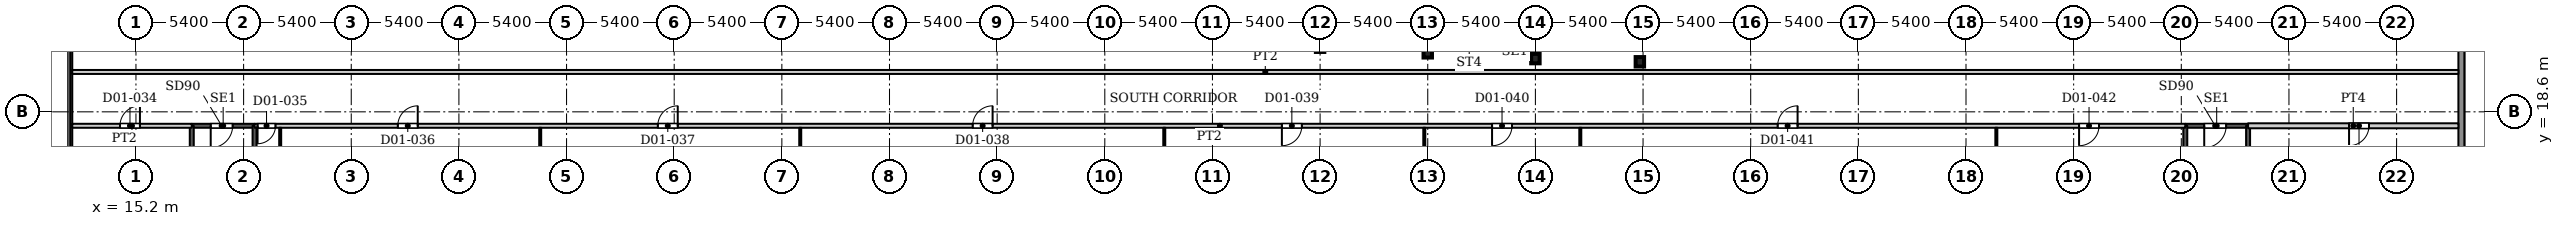
"""IFC4 building model, lengths in metres.
Left out: names, types, materials, properties, quantities, classifications, styles, units other than length and angle.
Written with IfcOpenShell. Run it as: python <this file> out.ifc"""

import sys

from ifc_helpers import new_model, si_unit, direction, frame, frame_2d, origin, origin_2d, place, context, subcontext, project, spatial, rectangle, i_section, extrude, source, transform, mapped, element, fill, save


model = new_model("IFC4")
c1 = context("Model", 3, precision=1e-05, world=origin(), true_north=direction((0.0, 1.0)))
c2 = subcontext(c1, "Body", "Model", "MODEL_VIEW")
j1 = project(units=[si_unit("LENGTHUNIT", "METRE"), si_unit("PLANEANGLEUNIT", "RADIAN")], contexts=[c1])
p1 = place(None, origin())
s1 = spatial("IfcSite", under=j1, at=p1, CompositionType="ELEMENT")
p2 = place(p1, origin())
s2 = spatial("IfcBuilding", under=s1, at=p2, CompositionType="ELEMENT")
p3 = place(p2, frame((0.0, 0.0, 7.5)))
s3 = spatial("IfcBuildingStorey", under=s2, at=p3, CompositionType="ELEMENT", Elevation=7.5)
for number, where, z_axis, x_axis in (
    (1, (90.64, 21.11, 0.0), (0.0, 0.0, 1.0), (1.0, 0.0, 0.0)),
    (2, (85.4, 21.27, 0.0), (0.0, 0.0, 1.0), (1.0, 0.0, 0.0)),
    (3, (80.0, 21.56, 0.0), (0.0, 0.0, 1.0), (1.0, 0.0, 0.0)),
):
    element("IfcColumn", number, at=place(p3, frame(where, z_axis=z_axis, x_axis=x_axis)), inside=s3, PredefinedType="COLUMN", context=c2, shape_type="SweptSolid", body=[
        extrude(i_section(OverallWidth=0.424, OverallDepth=0.474, WebThickness=0.048, FlangeThickness=0.077, FilletRadius=0.014, at=origin_2d()), origin(), (0.0, 0.0, 1.0), 5.0),
    ])
p4 = place(p3, frame((131.85, 54.72, 0.0), z_axis=(0.0, 0.0, 1.0), x_axis=(0.0, -1.0, 0.0)))
e4 = element("IfcWall", 4, at=p4, inside=s3, PredefinedType="SOLIDWALL", context=c2, shape_type="SweptSolid", body=[
    extrude(rectangle(XDim=38.72, YDim=0.3, at=frame_2d((19.36, 0.0))), origin(), (0.0, 0.0, 1.0), 4.75),
])
p5 = place(p4, frame((2.435, 0.0, 0.6)))
e5 = element("IfcOpeningElement", 5, at=p5, cuts=e4, PredefinedType="OPENING", context=c2, shape_type="SweptSolid", body=[
    extrude(rectangle(XDim=2.7, YDim=3.0, at=frame_2d((1.35, 1.5))), frame((0.0, 0.16, 0.0), z_axis=(0.0, -1.0, 0.0), x_axis=(1.0, 0.0, 0.0)), (0.0, 0.0, 1.0), 0.32),
])
p6 = place(p4, frame((13.58, 0.0, 0.6)))
e6 = element("IfcOpeningElement", 6, at=p6, cuts=e4, PredefinedType="OPENING", context=c2, shape_type="SweptSolid", body=[
    extrude(rectangle(XDim=2.7, YDim=3.0, at=frame_2d((1.35, 1.5))), frame((0.0, 0.16, 0.0), z_axis=(0.0, -1.0, 0.0), x_axis=(1.0, 0.0, 0.0)), (0.0, 0.0, 1.0), 0.32),
])
p7 = place(p4, frame((26.16, 0.0, 0.6)))
e7 = element("IfcOpeningElement", 7, at=p7, cuts=e4, PredefinedType="OPENING", context=c2, shape_type="SweptSolid", body=[
    extrude(rectangle(XDim=2.7, YDim=3.0, at=frame_2d((1.35, 1.5))), frame((0.0, 0.16, 0.0), z_axis=(0.0, -1.0, 0.0), x_axis=(1.0, 0.0, 0.0)), (0.0, 0.0, 1.0), 0.32),
])
p8 = place(p3, frame((18.0, 17.9, 0.0), z_axis=(0.0, 0.0, 1.0), x_axis=(1.0, 0.0, 0.0)))
e8 = element("IfcWall", 8, at=p8, inside=s3, PredefinedType="SHEAR", context=c2, shape_type="SweptSolid", body=[
    extrude(rectangle(XDim=3.15, YDim=0.2, at=frame_2d((1.575, 0.0))), origin(), (0.0, 0.0, 1.0), 5.0),
])
p9 = place(p8, frame((0.95, 0.0, 0.0)))
e9 = element("IfcOpeningElement", 9, at=p9, cuts=e8, PredefinedType="OPENING", context=c2, shape_type="SweptSolid", body=[
    extrude(rectangle(XDim=1.1, YDim=2.2, at=frame_2d((0.55, 1.1))), frame((0.0, 0.11, 0.0), z_axis=(0.0, -1.0, 0.0), x_axis=(1.0, 0.0, 0.0)), (0.0, 0.0, 1.0), 0.22),
])
p10 = place(p3, frame((18.0, 11.2, 0.0), z_axis=(0.0, 0.0, 1.0), x_axis=(0.0, 1.0, 0.0)))
e10 = element("IfcWall", 10, at=p10, inside=s3, PredefinedType="SHEAR", context=c2, shape_type="SweptSolid", body=[
    extrude(rectangle(XDim=6.7, YDim=0.2, at=frame_2d((3.35, 0.0))), origin(), (0.0, 0.0, 1.0), 5.0),
])
p11 = place(p3, frame((21.15, 10.0, 0.0), z_axis=(0.0, 0.0, 1.0), x_axis=(0.0, 1.0, 0.0)))
e11 = element("IfcWall", 11, at=p11, inside=s3, PredefinedType="SHEAR", context=c2, shape_type="SweptSolid", body=[
    extrude(rectangle(XDim=7.9, YDim=0.2, at=frame_2d((3.95, 0.0))), origin(), (0.0, 0.0, 1.0), 5.0),
])
p12 = place(p3, frame((118.0, 17.9, 0.0), z_axis=(0.0, 0.0, 1.0), x_axis=(1.0, 0.0, 0.0)))
e12 = element("IfcWall", 12, at=p12, inside=s3, PredefinedType="SHEAR", context=c2, shape_type="SweptSolid", body=[
    extrude(rectangle(XDim=3.15, YDim=0.2, at=frame_2d((1.575, 0.0))), origin(), (0.0, 0.0, 1.0), 5.0),
])
p13 = place(p12, frame((0.95, 0.0, 0.0)))
e13 = element("IfcOpeningElement", 13, at=p13, cuts=e12, PredefinedType="OPENING", context=c2, shape_type="SweptSolid", body=[
    extrude(rectangle(XDim=1.1, YDim=2.2, at=frame_2d((0.55, 1.1))), frame((0.0, 0.11, 0.0), z_axis=(0.0, -1.0, 0.0), x_axis=(1.0, 0.0, 0.0)), (0.0, 0.0, 1.0), 0.22),
])
p14 = place(p3, frame((118.0, 11.2, 0.0), z_axis=(0.0, 0.0, 1.0), x_axis=(0.0, 1.0, 0.0)))
e14 = element("IfcWall", 14, at=p14, inside=s3, PredefinedType="SHEAR", context=c2, shape_type="SweptSolid", body=[
    extrude(rectangle(XDim=6.7, YDim=0.2, at=frame_2d((3.35, 0.0))), origin(), (0.0, 0.0, 1.0), 5.0),
])
p15 = place(p3, frame((121.15, 10.0, 0.0), z_axis=(0.0, 0.0, 1.0), x_axis=(0.0, 1.0, 0.0)))
e15 = element("IfcWall", 15, at=p15, inside=s3, PredefinedType="SHEAR", context=c2, shape_type="SweptSolid", body=[
    extrude(rectangle(XDim=7.9, YDim=0.2, at=frame_2d((3.95, 0.0))), origin(), (0.0, 0.0, 1.0), 5.0),
])
p16 = place(p3, frame((12.0, 17.9, 0.0), z_axis=(0.0, 0.0, 1.0), x_axis=(1.0, 0.0, 0.0)))
e16 = element("IfcWall", 16, at=p16, inside=s3, PredefinedType="PARTITIONING", context=c2, shape_type="SweptSolid", body=[
    extrude(rectangle(XDim=6.0, YDim=0.2, at=frame_2d((3.0, 0.0))), origin(), (0.0, 0.0, 1.0), 4.68),
])
p17 = place(p16, frame((2.4, 0.0, 0.0)))
e17 = element("IfcOpeningElement", 17, at=p17, cuts=e16, PredefinedType="OPENING", context=c2, shape_type="SweptSolid", body=[
    extrude(rectangle(XDim=1.0, YDim=2.1, at=frame_2d((0.5, 1.05))), frame((0.0, 0.11, 0.0), z_axis=(0.0, -1.0, 0.0), x_axis=(1.0, 0.0, 0.0)), (0.0, 0.0, 1.0), 0.22),
])
p18 = place(p3, frame((12.0, 20.6, 0.0), z_axis=(0.0, 0.0, 1.0), x_axis=(1.0, 0.0, 0.0)))
e18 = element("IfcWall", 18, at=p18, inside=s3, PredefinedType="PARTITIONING", context=c2, shape_type="SweptSolid", body=[
    extrude(rectangle(XDim=119.701, YDim=0.2, at=frame_2d((59.851, 0.0))), origin(), (0.0, 0.0, 1.0), 4.68),
])
p19 = place(p3, frame((21.15, 17.9, 0.0), z_axis=(0.0, 0.0, 1.0), x_axis=(1.0, 0.0, 0.0)))
e19 = element("IfcWall", 19, at=p19, inside=s3, PredefinedType="PARTITIONING", context=c2, shape_type="SweptSolid", body=[
    extrude(rectangle(XDim=96.85, YDim=0.2, at=frame_2d((48.425, 0.0))), origin(), (0.0, 0.0, 1.0), 4.68),
])
p20 = place(p19, frame((0.15, 0.0, 0.0)))
e20 = element("IfcOpeningElement", 20, at=p20, cuts=e19, PredefinedType="OPENING", context=c2, shape_type="SweptSolid", body=[
    extrude(rectangle(XDim=0.9, YDim=2.1, at=frame_2d((0.45, 1.05))), frame((0.0, 0.11, 0.0), z_axis=(0.0, -1.0, 0.0), x_axis=(1.0, 0.0, 0.0)), (0.0, 0.0, 1.0), 0.22),
])
p21 = place(p19, frame((7.185, 0.0, 0.0)))
e21 = element("IfcOpeningElement", 21, at=p21, cuts=e19, PredefinedType="OPENING", context=c2, shape_type="SweptSolid", body=[
    extrude(rectangle(XDim=1.0, YDim=2.1, at=frame_2d((0.5, 1.05))), frame((0.0, 0.11, 0.0), z_axis=(0.0, -1.0, 0.0), x_axis=(1.0, 0.0, 0.0)), (0.0, 0.0, 1.0), 0.22),
])
p22 = place(p19, frame((20.228, 0.0, 0.0)))
e22 = element("IfcOpeningElement", 22, at=p22, cuts=e19, PredefinedType="OPENING", context=c2, shape_type="SweptSolid", body=[
    extrude(rectangle(XDim=1.0, YDim=2.1, at=frame_2d((0.5, 1.05))), frame((0.0, 0.11, 0.0), z_axis=(0.0, -1.0, 0.0), x_axis=(1.0, 0.0, 0.0)), (0.0, 0.0, 1.0), 0.22),
])
p23 = place(p19, frame((36.022, 0.0, 0.0)))
e23 = element("IfcOpeningElement", 23, at=p23, cuts=e19, PredefinedType="OPENING", context=c2, shape_type="SweptSolid", body=[
    extrude(rectangle(XDim=1.0, YDim=2.1, at=frame_2d((0.5, 1.05))), frame((0.0, 0.11, 0.0), z_axis=(0.0, -1.0, 0.0), x_axis=(1.0, 0.0, 0.0)), (0.0, 0.0, 1.0), 0.22),
])
p24 = place(p19, frame((51.533, 0.0, 0.0)))
e24 = element("IfcOpeningElement", 24, at=p24, cuts=e19, PredefinedType="OPENING", context=c2, shape_type="SweptSolid", body=[
    extrude(rectangle(XDim=1.0, YDim=2.1, at=frame_2d((0.5, 1.05))), frame((0.0, 0.11, 0.0), z_axis=(0.0, -1.0, 0.0), x_axis=(1.0, 0.0, 0.0)), (0.0, 0.0, 1.0), 0.22),
])
p25 = place(p19, frame((62.076, 0.0, 0.0)))
e25 = element("IfcOpeningElement", 25, at=p25, cuts=e19, PredefinedType="OPENING", context=c2, shape_type="SweptSolid", body=[
    extrude(rectangle(XDim=1.0, YDim=2.1, at=frame_2d((0.5, 1.05))), frame((0.0, 0.11, 0.0), z_axis=(0.0, -1.0, 0.0), x_axis=(1.0, 0.0, 0.0)), (0.0, 0.0, 1.0), 0.22),
])
p26 = place(p19, frame((76.402, 0.0, 0.0)))
e26 = element("IfcOpeningElement", 26, at=p26, cuts=e19, PredefinedType="OPENING", context=c2, shape_type="SweptSolid", body=[
    extrude(rectangle(XDim=1.0, YDim=2.1, at=frame_2d((0.5, 1.05))), frame((0.0, 0.11, 0.0), z_axis=(0.0, -1.0, 0.0), x_axis=(1.0, 0.0, 0.0)), (0.0, 0.0, 1.0), 0.22),
])
p27 = place(p19, frame((91.522, 0.0, 0.0)))
e27 = element("IfcOpeningElement", 27, at=p27, cuts=e19, PredefinedType="OPENING", context=c2, shape_type="SweptSolid", body=[
    extrude(rectangle(XDim=1.0, YDim=2.1, at=frame_2d((0.5, 1.05))), frame((0.0, 0.11, 0.0), z_axis=(0.0, -1.0, 0.0), x_axis=(1.0, 0.0, 0.0)), (0.0, 0.0, 1.0), 0.22),
])
for number, where, z_axis, x_axis in (
    (28, (22.435, 10.299, 0.0), (0.0, 0.0, 1.0), (0.0, 1.0, 0.0)),
    (29, (35.478, 10.299, 0.0), (0.0, 0.0, 1.0), (0.0, 1.0, 0.0)),
    (30, (48.522, 10.299, 0.0), (0.0, 0.0, 1.0), (0.0, 1.0, 0.0)),
):
    element("IfcWall", number, at=place(p3, frame(where, z_axis=z_axis, x_axis=x_axis)), inside=s3, PredefinedType="PARTITIONING", context=c2, shape_type="SweptSolid", body=[
        extrude(rectangle(XDim=7.501, YDim=0.1, at=frame_2d((3.75, 0.0))), origin(), (0.0, 0.0, 1.0), 4.68),
    ])
p28 = place(p3, frame((66.783, 10.0, 0.0), z_axis=(0.0, 0.0, 1.0), x_axis=(0.0, 1.0, 0.0)))
e31 = element("IfcWall", 31, at=p28, inside=s3, PredefinedType="PARTITIONING", context=c2, shape_type="SweptSolid", body=[
    extrude(rectangle(XDim=7.8, YDim=0.1, at=frame_2d((3.9, 0.0))), origin(), (0.0, 0.0, 1.0), 4.68),
])
p29 = place(p3, frame((79.826, 10.0, 0.0), z_axis=(0.0, 0.0, 1.0), x_axis=(0.0, 1.0, 0.0)))
e32 = element("IfcWall", 32, at=p29, inside=s3, PredefinedType="PARTITIONING", context=c2, shape_type="SweptSolid", body=[
    extrude(rectangle(XDim=7.8, YDim=0.1, at=frame_2d((3.9, 0.0))), origin(), (0.0, 0.0, 1.0), 4.263),
])
for number, where, z_axis, x_axis in (
    (33, (87.652, 10.0, 0.0), (0.0, 0.0, 1.0), (0.0, 1.0, 0.0)),
    (34, (108.522, 10.0, 0.0), (0.0, 0.0, 1.0), (0.0, 1.0, 0.0)),
):
    element("IfcWall", number, at=place(p3, frame(where, z_axis=z_axis, x_axis=x_axis)), inside=s3, PredefinedType="PARTITIONING", context=c2, shape_type="SweptSolid", body=[
        extrude(rectangle(XDim=7.8, YDim=0.1, at=frame_2d((3.9, 0.0))), origin(), (0.0, 0.0, 1.0), 4.68),
    ])
p30 = place(p3, frame((121.15, 17.9, 0.0), z_axis=(0.0, 0.0, 1.0), x_axis=(1.0, 0.0, 0.0)))
e35 = element("IfcWall", 35, at=p30, inside=s3, PredefinedType="PARTITIONING", context=c2, shape_type="SweptSolid", body=[
    extrude(rectangle(XDim=10.551, YDim=0.25, at=frame_2d((5.275, 0.0))), origin(), (0.0, 0.0, 1.0), 4.68),
])
p31 = place(p30, frame((5.065, 0.0, 0.0)))
e36 = element("IfcOpeningElement", 36, at=p31, cuts=e35, PredefinedType="OPENING", context=c2, shape_type="SweptSolid", body=[
    extrude(rectangle(XDim=1.0, YDim=2.1, at=frame_2d((0.5, 1.05))), frame((0.0, 0.135, 0.0), z_axis=(0.0, -1.0, 0.0), x_axis=(1.0, 0.0, 0.0)), (0.0, 0.0, 1.0), 0.27),
])
m1 = source(origin(), c2, "Body", "SweptSolid", [
    extrude(rectangle(XDim=1.1, YDim=2.2, at=frame_2d((0.55, 1.1))), frame((0.0, 0.025, 0.0), z_axis=(0.0, -1.0, 0.0), x_axis=(1.0, 0.0, 0.0)), (0.0, 0.0, 1.0), 0.05),
])
p32 = place(p9, origin())
e37 = element("IfcDoor", 37, at=p32, inside=s3, OperationType="SINGLE_SWING_RIGHT", PredefinedType="DOOR", context=c2, shape_type="MappedRepresentation", body=[
    mapped(m1, transform((0.0, 0.0, 0.0), x_axis=(1.0, 0.0, 0.0), y_axis=(0.0, 1.0, 0.0), z_axis=(0.0, 0.0, 1.0), scale=1.0)),
])
fill(e9, e37)
p33 = place(p13, origin())
e38 = element("IfcDoor", 38, at=p33, inside=s3, OperationType="SINGLE_SWING_RIGHT", PredefinedType="DOOR", context=c2, shape_type="MappedRepresentation", body=[
    mapped(m1, transform((0.0, 0.0, 0.0), x_axis=(1.0, 0.0, 0.0), y_axis=(0.0, 1.0, 0.0), z_axis=(0.0, 0.0, 1.0), scale=1.0)),
])
fill(e13, e38)
m2 = source(origin(), c2, "Body", "SweptSolid", [
    extrude(rectangle(XDim=1.0, YDim=2.1, at=frame_2d((0.5, 1.05))), frame((0.0, 0.025, 0.0), z_axis=(0.0, -1.0, 0.0), x_axis=(1.0, 0.0, 0.0)), (0.0, 0.0, 1.0), 0.05),
])
p34 = place(p17, origin())
e39 = element("IfcDoor", 39, at=p34, inside=s3, OperationType="SINGLE_SWING_LEFT", PredefinedType="DOOR", context=c2, shape_type="MappedRepresentation", body=[
    mapped(m2, transform((0.0, 0.0, 0.0), x_axis=(1.0, 0.0, 0.0), y_axis=(0.0, 1.0, 0.0), z_axis=(0.0, 0.0, 1.0), scale=1.0)),
])
fill(e17, e39)
m3 = source(origin(), c2, "Body", "SweptSolid", [
    extrude(rectangle(XDim=0.9, YDim=2.1, at=frame_2d((0.45, 1.05))), frame((0.0, 0.025, 0.0), z_axis=(0.0, -1.0, 0.0), x_axis=(1.0, 0.0, 0.0)), (0.0, 0.0, 1.0), 0.05),
])
p35 = place(p20, origin())
e40 = element("IfcDoor", 40, at=p35, inside=s3, OperationType="SINGLE_SWING_RIGHT", PredefinedType="DOOR", context=c2, shape_type="MappedRepresentation", body=[
    mapped(m3, transform((0.0, 0.0, 0.0), x_axis=(1.0, 0.0, 0.0), y_axis=(0.0, 1.0, 0.0), z_axis=(0.0, 0.0, 1.0), scale=1.0)),
])
fill(e20, e40)
p36 = place(p21, origin())
e41 = element("IfcDoor", 41, at=p36, inside=s3, OperationType="SINGLE_SWING_LEFT", PredefinedType="DOOR", context=c2, shape_type="MappedRepresentation", body=[
    mapped(m2, transform((0.0, 0.0, 0.0), x_axis=(1.0, 0.0, 0.0), y_axis=(0.0, 1.0, 0.0), z_axis=(0.0, 0.0, 1.0), scale=1.0)),
])
fill(e21, e41)
p37 = place(p22, origin())
e42 = element("IfcDoor", 42, at=p37, inside=s3, OperationType="SINGLE_SWING_LEFT", PredefinedType="DOOR", context=c2, shape_type="MappedRepresentation", body=[
    mapped(m2, transform((0.0, 0.0, 0.0), x_axis=(1.0, 0.0, 0.0), y_axis=(0.0, 1.0, 0.0), z_axis=(0.0, 0.0, 1.0), scale=1.0)),
])
fill(e22, e42)
p38 = place(p23, origin())
e43 = element("IfcDoor", 43, at=p38, inside=s3, OperationType="SINGLE_SWING_LEFT", PredefinedType="DOOR", context=c2, shape_type="MappedRepresentation", body=[
    mapped(m2, transform((0.0, 0.0, 0.0), x_axis=(1.0, 0.0, 0.0), y_axis=(0.0, 1.0, 0.0), z_axis=(0.0, 0.0, 1.0), scale=1.0)),
])
fill(e23, e43)
p39 = place(p24, origin())
e44 = element("IfcDoor", 44, at=p39, inside=s3, OperationType="SINGLE_SWING_RIGHT", PredefinedType="DOOR", context=c2, shape_type="MappedRepresentation", body=[
    mapped(m2, transform((0.0, 0.0, 0.0), x_axis=(1.0, 0.0, 0.0), y_axis=(0.0, 1.0, 0.0), z_axis=(0.0, 0.0, 1.0), scale=1.0)),
])
fill(e24, e44)
p40 = place(p25, origin())
e45 = element("IfcDoor", 45, at=p40, inside=s3, OperationType="SINGLE_SWING_RIGHT", PredefinedType="DOOR", context=c2, shape_type="MappedRepresentation", body=[
    mapped(m2, transform((0.0, 0.0, 0.0), x_axis=(1.0, 0.0, 0.0), y_axis=(0.0, 1.0, 0.0), z_axis=(0.0, 0.0, 1.0), scale=1.0)),
])
fill(e25, e45)
p41 = place(p26, origin())
e46 = element("IfcDoor", 46, at=p41, inside=s3, OperationType="SINGLE_SWING_LEFT", PredefinedType="DOOR", context=c2, shape_type="MappedRepresentation", body=[
    mapped(m2, transform((0.0, 0.0, 0.0), x_axis=(1.0, 0.0, 0.0), y_axis=(0.0, 1.0, 0.0), z_axis=(0.0, 0.0, 1.0), scale=1.0)),
])
fill(e26, e46)
p42 = place(p27, origin())
e47 = element("IfcDoor", 47, at=p42, inside=s3, OperationType="SINGLE_SWING_RIGHT", PredefinedType="DOOR", context=c2, shape_type="MappedRepresentation", body=[
    mapped(m2, transform((0.0, 0.0, 0.0), x_axis=(1.0, 0.0, 0.0), y_axis=(0.0, 1.0, 0.0), z_axis=(0.0, 0.0, 1.0), scale=1.0)),
])
fill(e27, e47)
m4 = source(origin(), c2, "Body", "SweptSolid", [
    extrude(rectangle(XDim=1.0, YDim=2.1, at=frame_2d((0.5, 1.05))), frame((0.0, 0.025, 0.0), z_axis=(0.0, -1.0, 0.0), x_axis=(1.0, 0.0, 0.0)), (0.0, 0.0, 1.0), 0.05),
])
p43 = place(p31, origin())
e48 = element("IfcDoor", 48, at=p43, inside=s3, OperationType="SINGLE_SWING_RIGHT", PredefinedType="DOOR", context=c2, shape_type="MappedRepresentation", body=[
    mapped(m4, transform((0.0, 0.0, 0.0), x_axis=(1.0, 0.0, 0.0), y_axis=(0.0, 1.0, 0.0), z_axis=(0.0, 0.0, 1.0), scale=1.0)),
])
fill(e36, e48)
save(model, sys.argv[1])
